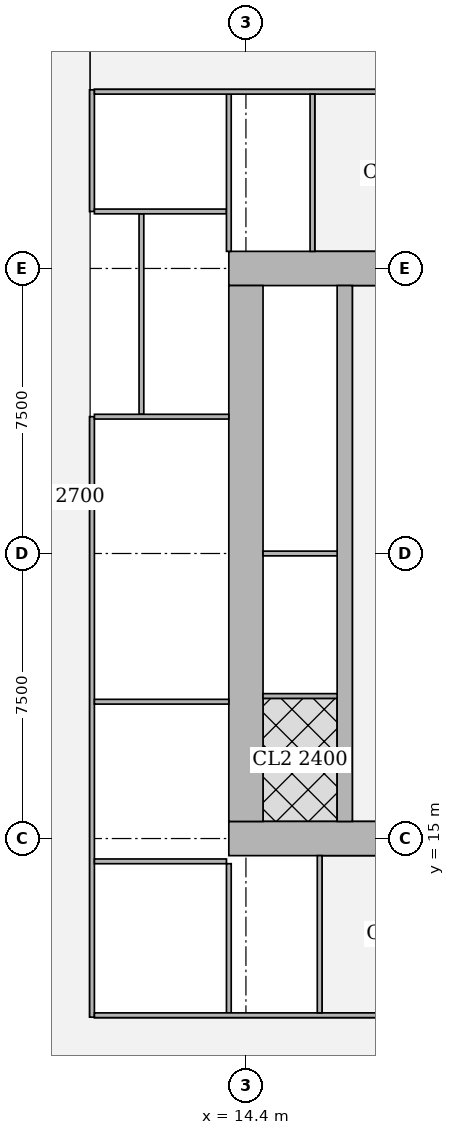
"""IFC4 building model, lengths in metres.
Left out: names, types, materials, properties, quantities, classifications, styles, units other than length and angle.
Written with IfcOpenShell. Run it as: python <this file> out.ifc"""

import sys

from ifc_helpers import new_model, si_unit, direction, frame, frame_2d, origin, place, context, subcontext, project, spatial, rectangle, extrude, element, fill, save


model = new_model("IFC4")
c1 = context("Model", 3, precision=1e-05, world=origin(), true_north=direction((0.0, 1.0)))
c2 = subcontext(c1, "Body", "Model", "MODEL_VIEW")
j1 = project(units=[si_unit("LENGTHUNIT", "METRE"), si_unit("PLANEANGLEUNIT", "RADIAN")], contexts=[c1])
p1 = place(None, origin())
s1 = spatial("IfcSite", under=j1, at=p1, CompositionType="ELEMENT")
p2 = place(p1, origin())
s2 = spatial("IfcBuilding", under=s1, at=p2, CompositionType="ELEMENT")
p3 = place(p2, frame((0.0, 0.0, 139.55)))
s3 = spatial("IfcBuildingStorey", under=s2, at=p3, CompositionType="ELEMENT", Elevation=139.55)
p4 = place(p3, frame((13.95, 15.0, 0.0), z_axis=(0.0, 0.0, 1.0), x_axis=(1.0, 0.0, 0.0)))
e1 = element("IfcWall", 1, at=p4, inside=s3, PredefinedType="SHEAR", context=c2, shape_type="SweptSolid", body=[
    extrude(rectangle(XDim=15.3, YDim=0.9, at=frame_2d((7.65, 0.0))), origin(), (0.0, 0.0, 1.0), 3.75),
])
p5 = place(p4, frame((4.45, 0.0, 0.0)))
e2 = element("IfcOpeningElement", 2, at=p5, cuts=e1, PredefinedType="OPENING", context=c2, shape_type="SweptSolid", body=[
    extrude(rectangle(XDim=1.8, YDim=2.1, at=frame_2d((0.9, 1.05))), frame((0.0, 0.46, 0.0), z_axis=(0.0, -1.0, 0.0), x_axis=(1.0, 0.0, 0.0)), (0.0, 0.0, 1.0), 0.92),
])
p6 = place(p4, frame((10.7, 0.0, 0.0)))
e3 = element("IfcOpeningElement", 3, at=p6, cuts=e1, PredefinedType="OPENING", context=c2, shape_type="SweptSolid", body=[
    extrude(rectangle(XDim=1.1, YDim=2.1, at=frame_2d((0.55, 1.05))), frame((0.0, 0.46, 0.0), z_axis=(0.0, -1.0, 0.0), x_axis=(1.0, 0.0, 0.0)), (0.0, 0.0, 1.0), 0.92),
])
p7 = place(p3, frame((13.95, 30.0, 0.0), z_axis=(0.0, 0.0, 1.0), x_axis=(1.0, 0.0, 0.0)))
e4 = element("IfcWall", 4, at=p7, inside=s3, PredefinedType="SHEAR", context=c2, shape_type="SweptSolid", body=[
    extrude(rectangle(XDim=15.3, YDim=0.9, at=frame_2d((7.65, 0.0))), origin(), (0.0, 0.0, 1.0), 3.75),
])
p8 = place(p7, frame((4.45, 0.0, 0.0)))
e5 = element("IfcOpeningElement", 5, at=p8, cuts=e4, PredefinedType="OPENING", context=c2, shape_type="SweptSolid", body=[
    extrude(rectangle(XDim=1.8, YDim=2.1, at=frame_2d((0.9, 1.05))), frame((0.0, 0.46, 0.0), z_axis=(0.0, -1.0, 0.0), x_axis=(1.0, 0.0, 0.0)), (0.0, 0.0, 1.0), 0.92),
])
p9 = place(p7, frame((10.7, 0.0, 0.0)))
e6 = element("IfcOpeningElement", 6, at=p9, cuts=e4, PredefinedType="OPENING", context=c2, shape_type="SweptSolid", body=[
    extrude(rectangle(XDim=1.1, YDim=2.1, at=frame_2d((0.55, 1.05))), frame((0.0, 0.46, 0.0), z_axis=(0.0, -1.0, 0.0), x_axis=(1.0, 0.0, 0.0)), (0.0, 0.0, 1.0), 0.92),
])
p10 = place(p3, frame((14.4, 15.45, 0.0), z_axis=(0.0, 0.0, 1.0), x_axis=(0.0, 1.0, 0.0)))
e7 = element("IfcWall", 7, at=p10, inside=s3, PredefinedType="SHEAR", context=c2, shape_type="SweptSolid", body=[
    extrude(rectangle(XDim=14.1, YDim=0.9, at=frame_2d((7.05, 0.0))), origin(), (0.0, 0.0, 1.0), 3.75),
])
p11 = place(p3, frame((17.0, 15.45, 0.0), z_axis=(0.0, 0.0, 1.0), x_axis=(0.0, 1.0, 0.0)))
e8 = element("IfcWall", 8, at=p11, inside=s3, PredefinedType="SHEAR", context=c2, shape_type="SweptSolid", body=[
    extrude(rectangle(XDim=14.1, YDim=0.4, at=frame_2d((7.05, 0.0))), origin(), (0.0, 0.0, 1.0), 3.75),
])
p12 = place(p11, frame((0.925, 0.0, 0.0)))
e9 = element("IfcOpeningElement", 9, at=p12, cuts=e8, PredefinedType="OPENING", context=c2, shape_type="SweptSolid", body=[
    extrude(rectangle(XDim=1.0, YDim=2.1, at=frame_2d((0.5, 1.05))), frame((0.0, 0.21, 0.0), z_axis=(0.0, -1.0, 0.0), x_axis=(1.0, 0.0, 0.0)), (0.0, 0.0, 1.0), 0.42),
])
p13 = place(p11, frame((4.675, 0.0, 0.0)))
e10 = element("IfcOpeningElement", 10, at=p13, cuts=e8, PredefinedType="OPENING", context=c2, shape_type="SweptSolid", body=[
    extrude(rectangle(XDim=1.0, YDim=2.1, at=frame_2d((0.5, 1.05))), frame((0.0, 0.21, 0.0), z_axis=(0.0, -1.0, 0.0), x_axis=(1.0, 0.0, 0.0)), (0.0, 0.0, 1.0), 0.42),
])
p14 = place(p11, frame((8.425, 0.0, 0.0)))
e11 = element("IfcOpeningElement", 11, at=p14, cuts=e8, PredefinedType="OPENING", context=c2, shape_type="SweptSolid", body=[
    extrude(rectangle(XDim=1.0, YDim=2.1, at=frame_2d((0.5, 1.05))), frame((0.0, 0.21, 0.0), z_axis=(0.0, -1.0, 0.0), x_axis=(1.0, 0.0, 0.0)), (0.0, 0.0, 1.0), 0.42),
])
p15 = place(p11, frame((12.175, 0.0, 0.0)))
e12 = element("IfcOpeningElement", 12, at=p15, cuts=e8, PredefinedType="OPENING", context=c2, shape_type="SweptSolid", body=[
    extrude(rectangle(XDim=1.0, YDim=2.1, at=frame_2d((0.5, 1.05))), frame((0.0, 0.21, 0.0), z_axis=(0.0, -1.0, 0.0), x_axis=(1.0, 0.0, 0.0)), (0.0, 0.0, 1.0), 0.42),
])
p16 = place(p3, frame((10.35, 10.3, 0.0), z_axis=(0.0, 0.0, 1.0), x_axis=(0.0, 1.0, 0.0)))
e13 = element("IfcWall", 13, at=p16, inside=s3, PredefinedType="PARTITIONING", context=c2, shape_type="SweptSolid", body=[
    extrude(rectangle(XDim=15.8, YDim=0.125, at=frame_2d((7.9, 0.0))), origin(), (0.0, 0.0, 1.0), 3.5),
])
p17 = place(p16, frame((1.55, 0.0, 0.0)))
e14 = element("IfcOpeningElement", 14, at=p17, cuts=e13, PredefinedType="OPENING", context=c2, shape_type="SweptSolid", body=[
    extrude(rectangle(XDim=1.0, YDim=2.1, at=frame_2d((0.5, 1.05))), frame((0.0, 0.073, 0.0), z_axis=(0.0, -1.0, 0.0), x_axis=(1.0, 0.0, 0.0)), (0.0, 0.0, 1.0), 0.145),
])
p18 = place(p16, frame((5.7, 0.0, 0.0)))
e15 = element("IfcOpeningElement", 15, at=p18, cuts=e13, PredefinedType="OPENING", context=c2, shape_type="SweptSolid", body=[
    extrude(rectangle(XDim=1.0, YDim=2.1, at=frame_2d((0.5, 1.05))), frame((0.0, 0.073, 0.0), z_axis=(0.0, -1.0, 0.0), x_axis=(1.0, 0.0, 0.0)), (0.0, 0.0, 1.0), 0.145),
])
p19 = place(p16, frame((11.55, 0.0, 0.0)))
e16 = element("IfcOpeningElement", 16, at=p19, cuts=e13, PredefinedType="OPENING", context=c2, shape_type="SweptSolid", body=[
    extrude(rectangle(XDim=1.0, YDim=2.1, at=frame_2d((0.5, 1.05))), frame((0.0, 0.073, 0.0), z_axis=(0.0, -1.0, 0.0), x_axis=(1.0, 0.0, 0.0)), (0.0, 0.0, 1.0), 0.145),
])
p20 = place(p3, frame((10.35, 31.5, 0.0), z_axis=(0.0, 0.0, 1.0), x_axis=(0.0, 1.0, 0.0)))
e17 = element("IfcWall", 17, at=p20, inside=s3, PredefinedType="PARTITIONING", context=c2, shape_type="SweptSolid", body=[
    extrude(rectangle(XDim=3.2, YDim=0.125, at=frame_2d((1.6, 0.0))), origin(), (0.0, 0.0, 1.0), 3.5),
])
p21 = place(p20, frame((1.1, 0.0, 0.0)))
e18 = element("IfcOpeningElement", 18, at=p21, cuts=e17, PredefinedType="OPENING", context=c2, shape_type="SweptSolid", body=[
    extrude(rectangle(XDim=1.0, YDim=2.1, at=frame_2d((0.5, 1.05))), frame((0.0, 0.073, 0.0), z_axis=(0.0, -1.0, 0.0), x_axis=(1.0, 0.0, 0.0)), (0.0, 0.0, 1.0), 0.145),
])
p22 = place(p3, frame((11.65, 26.163, 0.0), z_axis=(0.0, 0.0, 1.0), x_axis=(0.0, 1.0, 0.0)))
e19 = element("IfcWall", 19, at=p22, inside=s3, PredefinedType="PARTITIONING", context=c2, shape_type="SweptSolid", body=[
    extrude(rectangle(XDim=5.275, YDim=0.125, at=frame_2d((2.637, 0.0))), origin(), (0.0, 0.0, 1.0), 3.5),
])
p23 = place(p22, frame((2.137, 0.0, 0.0)))
e20 = element("IfcOpeningElement", 20, at=p23, cuts=e19, PredefinedType="OPENING", context=c2, shape_type="SweptSolid", body=[
    extrude(rectangle(XDim=1.0, YDim=2.1, at=frame_2d((0.5, 1.05))), frame((0.0, 0.073, 0.0), z_axis=(0.0, -1.0, 0.0), x_axis=(1.0, 0.0, 0.0)), (0.0, 0.0, 1.0), 0.145),
])
p24 = place(p3, frame((10.413, 14.4, 0.0), z_axis=(0.0, 0.0, 1.0), x_axis=(1.0, 0.0, 0.0)))
e21 = element("IfcWall", 21, at=p24, inside=s3, PredefinedType="PARTITIONING", context=c2, shape_type="SweptSolid", body=[
    extrude(rectangle(XDim=3.475, YDim=0.125, at=frame_2d((1.737, 0.0))), origin(), (0.0, 0.0, 1.0), 3.5),
])
for number, where, z_axis, x_axis in (
    (22, (10.413, 18.6, 0.0), (0.0, 0.0, 1.0), (1.0, 0.0, 0.0)),
    (23, (10.413, 26.1, 0.0), (0.0, 0.0, 1.0), (1.0, 0.0, 0.0)),
):
    element("IfcWall", number, at=place(p3, frame(where, z_axis=z_axis, x_axis=x_axis)), inside=s3, PredefinedType="PARTITIONING", context=c2, shape_type="SweptSolid", body=[
        extrude(rectangle(XDim=3.537, YDim=0.125, at=frame_2d((1.769, 0.0))), origin(), (0.0, 0.0, 1.0), 3.5),
    ])
p25 = place(p3, frame((10.413, 31.5, 0.0), z_axis=(0.0, 0.0, 1.0), x_axis=(1.0, 0.0, 0.0)))
e24 = element("IfcWall", 24, at=p25, inside=s3, PredefinedType="PARTITIONING", context=c2, shape_type="SweptSolid", body=[
    extrude(rectangle(XDim=3.475, YDim=0.125, at=frame_2d((1.737, 0.0))), origin(), (0.0, 0.0, 1.0), 3.5),
])
p26 = place(p3, frame((13.95, 10.413, 0.0), z_axis=(0.0, 0.0, 1.0), x_axis=(0.0, 1.0, 0.0)))
e25 = element("IfcWall", 25, at=p26, inside=s3, PredefinedType="PARTITIONING", context=c2, shape_type="SweptSolid", body=[
    extrude(rectangle(XDim=3.925, YDim=0.125, at=frame_2d((1.962, 0.0))), origin(), (0.0, 0.0, 1.0), 3.5),
])
p27 = place(p3, frame((13.95, 30.45, 0.0), z_axis=(0.0, 0.0, 1.0), x_axis=(0.0, 1.0, 0.0)))
e26 = element("IfcWall", 26, at=p27, inside=s3, PredefinedType="PARTITIONING", context=c2, shape_type="SweptSolid", body=[
    extrude(rectangle(XDim=4.137, YDim=0.125, at=frame_2d((2.068, 0.0))), origin(), (0.0, 0.0, 1.0), 3.5),
])
p28 = place(p3, frame((10.413, 10.35, 0.0), z_axis=(0.0, 0.0, 1.0), x_axis=(1.0, 0.0, 0.0)))
e27 = element("IfcWall", 27, at=p28, inside=s3, PredefinedType="PARTITIONING", context=c2, shape_type="SweptSolid", body=[
    extrude(rectangle(XDim=10.837, YDim=0.125, at=frame_2d((5.418, 0.0))), origin(), (0.0, 0.0, 1.0), 3.5),
])
p29 = place(p28, frame((7.582, 0.0, 0.0)))
e28 = element("IfcOpeningElement", 28, at=p29, cuts=e27, PredefinedType="OPENING", context=c2, shape_type="SweptSolid", body=[
    extrude(rectangle(XDim=1.8, YDim=2.1, at=frame_2d((0.9, 1.05))), frame((0.0, 0.073, 0.0), z_axis=(0.0, -1.0, 0.0), x_axis=(1.0, 0.0, 0.0)), (0.0, 0.0, 1.0), 0.145),
])
p30 = place(p3, frame((10.413, 34.65, 0.0), z_axis=(0.0, 0.0, 1.0), x_axis=(1.0, 0.0, 0.0)))
e29 = element("IfcWall", 29, at=p30, inside=s3, PredefinedType="PARTITIONING", context=c2, shape_type="SweptSolid", body=[
    extrude(rectangle(XDim=10.837, YDim=0.125, at=frame_2d((5.418, 0.0))), origin(), (0.0, 0.0, 1.0), 3.5),
])
p31 = place(p30, frame((7.487, 0.0, 0.0)))
e30 = element("IfcOpeningElement", 30, at=p31, cuts=e29, PredefinedType="OPENING", context=c2, shape_type="SweptSolid", body=[
    extrude(rectangle(XDim=1.8, YDim=2.1, at=frame_2d((0.9, 1.05))), frame((0.0, 0.073, 0.0), z_axis=(0.0, -1.0, 0.0), x_axis=(1.0, 0.0, 0.0)), (0.0, 0.0, 1.0), 0.145),
])
p32 = place(p3, frame((16.34, 10.413, 0.0), z_axis=(0.0, 0.0, 1.0), x_axis=(0.0, 1.0, 0.0)))
e31 = element("IfcWall", 31, at=p32, inside=s3, PredefinedType="PARTITIONING", context=c2, shape_type="SweptSolid", body=[
    extrude(rectangle(XDim=4.137, YDim=0.125, at=frame_2d((2.068, 0.0))), origin(), (0.0, 0.0, 1.0), 3.5),
])
p33 = place(p32, frame((1.512, 0.0, 0.0)))
e32 = element("IfcOpeningElement", 32, at=p33, cuts=e31, PredefinedType="OPENING", context=c2, shape_type="SweptSolid", body=[
    extrude(rectangle(XDim=1.0, YDim=2.1, at=frame_2d((0.5, 1.05))), frame((0.0, 0.073, 0.0), z_axis=(0.0, -1.0, 0.0), x_axis=(1.0, 0.0, 0.0)), (0.0, 0.0, 1.0), 0.145),
])
p34 = place(p3, frame((16.15, 30.45, 0.0), z_axis=(0.0, 0.0, 1.0), x_axis=(0.0, 1.0, 0.0)))
e33 = element("IfcWall", 33, at=p34, inside=s3, PredefinedType="PARTITIONING", context=c2, shape_type="SweptSolid", body=[
    extrude(rectangle(XDim=4.137, YDim=0.125, at=frame_2d((2.068, 0.0))), origin(), (0.0, 0.0, 1.0), 3.5),
])
p35 = place(p34, frame((1.625, 0.0, 0.0)))
e34 = element("IfcOpeningElement", 34, at=p35, cuts=e33, PredefinedType="OPENING", context=c2, shape_type="SweptSolid", body=[
    extrude(rectangle(XDim=1.0, YDim=2.1, at=frame_2d((0.5, 1.05))), frame((0.0, 0.073, 0.0), z_axis=(0.0, -1.0, 0.0), x_axis=(1.0, 0.0, 0.0)), (0.0, 0.0, 1.0), 0.145),
])
for number, where, z_axis, x_axis in (
    (35, (14.85, 18.75, 0.0), (0.0, 0.0, 1.0), (1.0, 0.0, 0.0)),
    (36, (14.85, 22.5, 0.0), (0.0, 0.0, 1.0), (1.0, 0.0, 0.0)),
):
    element("IfcWall", number, at=place(p3, frame(where, z_axis=z_axis, x_axis=x_axis)), inside=s3, PredefinedType="PARTITIONING", context=c2, shape_type="SweptSolid", body=[
        extrude(rectangle(XDim=1.95, YDim=0.125, at=frame_2d((0.975, 0.0))), origin(), (0.0, 0.0, 1.0), 3.5),
    ])
p36 = place(p17, origin())
e37 = element("IfcDoor", 37, at=p36, inside=s3, OperationType="SINGLE_SWING_RIGHT", PredefinedType="DOOR", context=c2, shape_type="SweptSolid", body=[
    extrude(rectangle(XDim=1.0, YDim=2.1, at=frame_2d((0.5, 1.05))), frame((0.0, 0.025, 0.0), z_axis=(0.0, -1.0, 0.0), x_axis=(1.0, 0.0, 0.0)), (0.0, 0.0, 1.0), 0.05),
])
fill(e14, e37)
p37 = place(p18, origin())
e38 = element("IfcDoor", 38, at=p37, inside=s3, OperationType="SINGLE_SWING_LEFT", PredefinedType="DOOR", context=c2, shape_type="SweptSolid", body=[
    extrude(rectangle(XDim=1.0, YDim=2.1, at=frame_2d((0.5, 1.05))), frame((0.0, 0.025, 0.0), z_axis=(0.0, -1.0, 0.0), x_axis=(1.0, 0.0, 0.0)), (0.0, 0.0, 1.0), 0.05),
])
fill(e15, e38)
p38 = place(p19, origin())
e39 = element("IfcDoor", 39, at=p38, inside=s3, OperationType="SINGLE_SWING_LEFT", PredefinedType="DOOR", context=c2, shape_type="SweptSolid", body=[
    extrude(rectangle(XDim=1.0, YDim=2.1, at=frame_2d((0.5, 1.05))), frame((0.0, 0.025, 0.0), z_axis=(0.0, -1.0, 0.0), x_axis=(1.0, 0.0, 0.0)), (0.0, 0.0, 1.0), 0.05),
])
fill(e16, e39)
p39 = place(p23, origin())
e40 = element("IfcDoor", 40, at=p39, inside=s3, OperationType="SINGLE_SWING_LEFT", PredefinedType="DOOR", context=c2, shape_type="SweptSolid", body=[
    extrude(rectangle(XDim=1.0, YDim=2.1, at=frame_2d((0.5, 1.05))), frame((0.0, 0.025, 0.0), z_axis=(0.0, -1.0, 0.0), x_axis=(1.0, 0.0, 0.0)), (0.0, 0.0, 1.0), 0.05),
])
fill(e20, e40)
p40 = place(p21, origin())
e41 = element("IfcDoor", 41, at=p40, inside=s3, OperationType="SINGLE_SWING_RIGHT", PredefinedType="DOOR", context=c2, shape_type="SweptSolid", body=[
    extrude(rectangle(XDim=1.0, YDim=2.1, at=frame_2d((0.5, 1.05))), frame((0.0, 0.025, 0.0), z_axis=(0.0, -1.0, 0.0), x_axis=(1.0, 0.0, 0.0)), (0.0, 0.0, 1.0), 0.05),
])
fill(e18, e41)
p41 = place(p33, origin())
e42 = element("IfcDoor", 42, at=p41, inside=s3, OperationType="SINGLE_SWING_LEFT", PredefinedType="DOOR", context=c2, shape_type="SweptSolid", body=[
    extrude(rectangle(XDim=1.0, YDim=2.1, at=frame_2d((0.5, 1.05))), frame((0.0, 0.025, 0.0), z_axis=(0.0, -1.0, 0.0), x_axis=(1.0, 0.0, 0.0)), (0.0, 0.0, 1.0), 0.05),
])
fill(e32, e42)
p42 = place(p35, origin())
e43 = element("IfcDoor", 43, at=p42, inside=s3, OperationType="SINGLE_SWING_RIGHT", PredefinedType="DOOR", context=c2, shape_type="SweptSolid", body=[
    extrude(rectangle(XDim=1.0, YDim=2.1, at=frame_2d((0.5, 1.05))), frame((0.0, 0.025, 0.0), z_axis=(0.0, -1.0, 0.0), x_axis=(1.0, 0.0, 0.0)), (0.0, 0.0, 1.0), 0.05),
])
fill(e34, e43)
p43 = place(p12, origin())
e44 = element("IfcDoor", 44, at=p43, inside=s3, OperationType="SINGLE_SWING_LEFT", PredefinedType="DOOR", context=c2, shape_type="SweptSolid", body=[
    extrude(rectangle(XDim=1.0, YDim=2.1, at=frame_2d((0.5, 1.05))), frame((0.0, 0.025, 0.0), z_axis=(0.0, -1.0, 0.0), x_axis=(1.0, 0.0, 0.0)), (0.0, 0.0, 1.0), 0.05),
])
fill(e9, e44)
p44 = place(p13, origin())
e45 = element("IfcDoor", 45, at=p44, inside=s3, OperationType="SINGLE_SWING_LEFT", PredefinedType="DOOR", context=c2, shape_type="SweptSolid", body=[
    extrude(rectangle(XDim=1.0, YDim=2.1, at=frame_2d((0.5, 1.05))), frame((0.0, 0.025, 0.0), z_axis=(0.0, -1.0, 0.0), x_axis=(1.0, 0.0, 0.0)), (0.0, 0.0, 1.0), 0.05),
])
fill(e10, e45)
p45 = place(p14, origin())
e46 = element("IfcDoor", 46, at=p45, inside=s3, OperationType="SINGLE_SWING_LEFT", PredefinedType="DOOR", context=c2, shape_type="SweptSolid", body=[
    extrude(rectangle(XDim=1.0, YDim=2.1, at=frame_2d((0.5, 1.05))), frame((0.0, 0.025, 0.0), z_axis=(0.0, -1.0, 0.0), x_axis=(1.0, 0.0, 0.0)), (0.0, 0.0, 1.0), 0.05),
])
fill(e11, e46)
p46 = place(p15, origin())
e47 = element("IfcDoor", 47, at=p46, inside=s3, OperationType="SINGLE_SWING_RIGHT", PredefinedType="DOOR", context=c2, shape_type="SweptSolid", body=[
    extrude(rectangle(XDim=1.0, YDim=2.1, at=frame_2d((0.5, 1.05))), frame((0.0, 0.025, 0.0), z_axis=(0.0, -1.0, 0.0), x_axis=(1.0, 0.0, 0.0)), (0.0, 0.0, 1.0), 0.05),
])
fill(e12, e47)
save(model, sys.argv[1])
